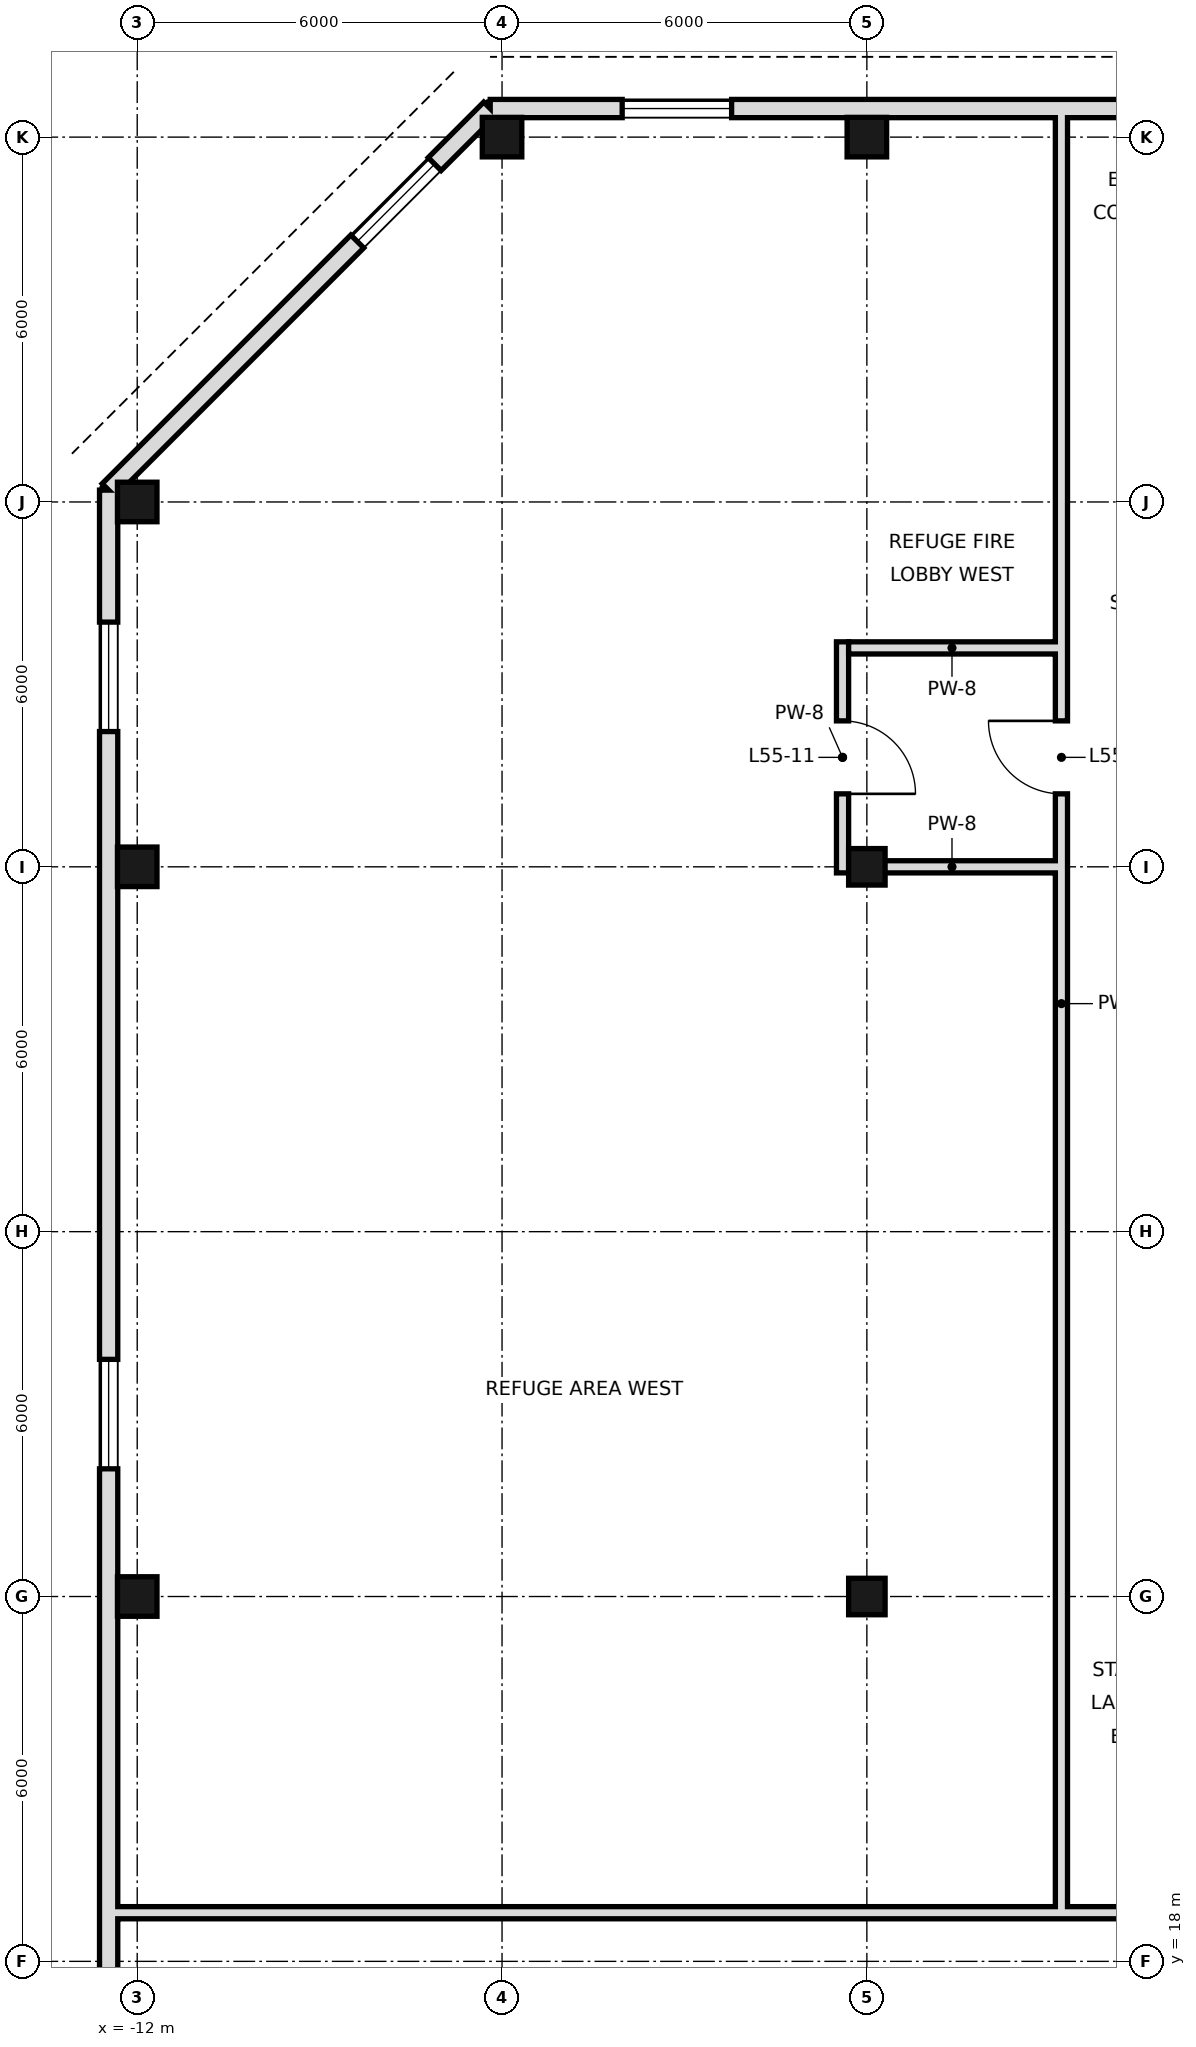
"""IFC4 building model, lengths in metres.
Left out: names, types, materials, properties, quantities, classifications, styles, units other than length and angle.
Written with IfcOpenShell. Run it as: python <this file> out.ifc"""

import sys

from ifc_helpers import new_model, si_unit, direction, frame, frame_2d, origin, origin_2d, place, context, subcontext, project, spatial, rectangle, hollow_rectangle, extrude, element, fill, save


model = new_model("IFC4")
c1 = context("Model", 3, precision=1e-05, world=origin(), true_north=direction((0.0, 1.0)))
c2 = subcontext(c1, "Body", "Model", "MODEL_VIEW")
j1 = project(units=[si_unit("LENGTHUNIT", "METRE"), si_unit("PLANEANGLEUNIT", "RADIAN")], contexts=[c1])
p1 = place(None, origin())
s1 = spatial("IfcSite", under=j1, at=p1, CompositionType="ELEMENT")
p2 = place(p1, origin())
s2 = spatial("IfcBuilding", under=s1, at=p2, CompositionType="ELEMENT")
p3 = place(p2, frame((0.0, 0.0, 234.2)))
s3 = spatial("IfcBuildingStorey", under=s2, at=p3, CompositionType="ELEMENT", Elevation=234.2)
for number, where, z_axis, x_axis in (
    (1, (-12.0, 24.0, 0.0), (0.0, 0.0, 1.0), (1.0, 0.0, 0.0)),
    (2, (-12.0, 36.0, 0.0), (0.0, 0.0, 1.0), (1.0, 0.0, 0.0)),
    (3, (-12.0, 42.0, 0.0), (0.0, 0.0, 1.0), (1.0, 0.0, 0.0)),
    (4, (-6.0, 48.0, 0.0), (0.0, 0.0, 1.0), (1.0, 0.0, 0.0)),
):
    element("IfcColumn", number, at=place(p3, frame(where, z_axis=z_axis, x_axis=x_axis)), inside=s3, PredefinedType="COLUMN", context=c2, shape_type="SweptSolid", body=[
        extrude(hollow_rectangle(XDim=0.65, YDim=0.65, WallThickness=0.032, at=origin_2d()), origin(), (0.0, 0.0, 1.0), 5.4),
    ])
for number, where, z_axis, x_axis in (
    (5, (0.0, 24.0, 0.0), (0.0, 0.0, 1.0), (1.0, 0.0, 0.0)),
    (6, (0.0, 36.0, 0.0), (0.0, 0.0, 1.0), (1.0, 0.0, 0.0)),
):
    element("IfcColumn", number, at=place(p3, frame(where, z_axis=z_axis, x_axis=x_axis)), inside=s3, PredefinedType="COLUMN", context=c2, shape_type="SweptSolid", body=[
        extrude(hollow_rectangle(XDim=0.6, YDim=0.6, WallThickness=0.028, at=origin_2d()), origin(), (0.0, 0.0, 1.0), 5.4),
    ])
p4 = place(p3, frame((0.0, 48.0, 0.0), z_axis=(0.0, 0.0, 1.0), x_axis=(1.0, 0.0, 0.0)))
e7 = element("IfcColumn", 7, at=p4, inside=s3, PredefinedType="COLUMN", context=c2, shape_type="SweptSolid", body=[
    extrude(hollow_rectangle(XDim=0.65, YDim=0.65, WallThickness=0.032, at=origin_2d()), origin(), (0.0, 0.0, 1.0), 5.4),
])
p5 = place(p3, frame((48.195, 48.47, 0.0), z_axis=(0.0, 0.0, 1.0), x_axis=(-1.0, 0.0, 0.0)))
e8 = element("IfcWall", 8, at=p5, inside=s3, PredefinedType="SOLIDWALL", context=c2, shape_type="SweptSolid", body=[
    extrude(rectangle(XDim=54.389, YDim=0.3, at=frame_2d((27.195, 0.0))), origin(), (0.0, 0.0, 1.0), 5.22),
])
p6 = place(p5, frame((1.271, 0.0, 0.9)))
e9 = element("IfcOpeningElement", 9, at=p6, cuts=e8, PredefinedType="OPENING", context=c2, shape_type="SweptSolid", body=[
    extrude(rectangle(XDim=1.8, YDim=1.5, at=frame_2d((0.9, 0.75))), frame((0.0, 0.16, 0.0), z_axis=(0.0, -1.0, 0.0), x_axis=(1.0, 0.0, 0.0)), (0.0, 0.0, 1.0), 0.32),
])
p7 = place(p5, frame((14.295, 0.0, 0.9)))
e10 = element("IfcOpeningElement", 10, at=p7, cuts=e8, PredefinedType="OPENING", context=c2, shape_type="SweptSolid", body=[
    extrude(rectangle(XDim=1.8, YDim=1.5, at=frame_2d((0.9, 0.75))), frame((0.0, 0.16, 0.0), z_axis=(0.0, -1.0, 0.0), x_axis=(1.0, 0.0, 0.0)), (0.0, 0.0, 1.0), 0.32),
])
p8 = place(p5, frame((26.295, 0.0, 0.9)))
e11 = element("IfcOpeningElement", 11, at=p8, cuts=e8, PredefinedType="OPENING", context=c2, shape_type="SweptSolid", body=[
    extrude(rectangle(XDim=1.8, YDim=1.5, at=frame_2d((0.9, 0.75))), frame((0.0, 0.16, 0.0), z_axis=(0.0, -1.0, 0.0), x_axis=(1.0, 0.0, 0.0)), (0.0, 0.0, 1.0), 0.32),
])
p9 = place(p5, frame((38.295, 0.0, 0.9)))
e12 = element("IfcOpeningElement", 12, at=p9, cuts=e8, PredefinedType="OPENING", context=c2, shape_type="SweptSolid", body=[
    extrude(rectangle(XDim=1.8, YDim=1.5, at=frame_2d((0.9, 0.75))), frame((0.0, 0.16, 0.0), z_axis=(0.0, -1.0, 0.0), x_axis=(1.0, 0.0, 0.0)), (0.0, 0.0, 1.0), 0.32),
])
p10 = place(p5, frame((50.419, 0.0, 0.9)))
e13 = element("IfcOpeningElement", 13, at=p10, cuts=e8, PredefinedType="OPENING", context=c2, shape_type="SweptSolid", body=[
    extrude(rectangle(XDim=1.8, YDim=1.5, at=frame_2d((0.9, 0.75))), frame((0.0, 0.16, 0.0), z_axis=(0.0, -1.0, 0.0), x_axis=(1.0, 0.0, 0.0)), (0.0, 0.0, 1.0), 0.32),
])
p11 = place(p3, frame((-6.195, 48.47, 0.0), z_axis=(0.0, 0.0, 1.0), x_axis=(-0.707106781187, -0.707106781187, 0.0)))
e14 = element("IfcWall", 14, at=p11, inside=s3, PredefinedType="SOLIDWALL", context=c2, shape_type="SweptSolid", body=[
    extrude(rectangle(XDim=8.875, YDim=0.3, at=frame_2d((4.438, 0.0))), origin(), (0.0, 0.0, 1.0), 5.22),
])
p12 = place(p11, frame((1.292, 0.0, 0.9)))
e15 = element("IfcOpeningElement", 15, at=p12, cuts=e14, PredefinedType="OPENING", context=c2, shape_type="SweptSolid", body=[
    extrude(rectangle(XDim=1.8, YDim=1.5, at=frame_2d((0.9, 0.75))), frame((0.0, 0.16, 0.0), z_axis=(0.0, -1.0, 0.0), x_axis=(1.0, 0.0, 0.0)), (0.0, 0.0, 1.0), 0.32),
])
p13 = place(p3, frame((-12.47, 42.195, 0.0), z_axis=(0.0, 0.0, 1.0), x_axis=(0.0, -1.0, 0.0)))
e16 = element("IfcWall", 16, at=p13, inside=s3, PredefinedType="SOLIDWALL", context=c2, shape_type="SweptSolid", body=[
    extrude(rectangle(XDim=36.389, YDim=0.3, at=frame_2d((18.195, 0.0))), origin(), (0.0, 0.0, 1.0), 5.22),
])
p14 = place(p13, frame((2.17, 0.0, 0.9)))
e17 = element("IfcOpeningElement", 17, at=p14, cuts=e16, PredefinedType="OPENING", context=c2, shape_type="SweptSolid", body=[
    extrude(rectangle(XDim=1.8, YDim=1.5, at=frame_2d((0.9, 0.75))), frame((0.0, 0.16, 0.0), z_axis=(0.0, -1.0, 0.0), x_axis=(1.0, 0.0, 0.0)), (0.0, 0.0, 1.0), 0.32),
])
p15 = place(p13, frame((14.295, 0.0, 0.9)))
e18 = element("IfcOpeningElement", 18, at=p15, cuts=e16, PredefinedType="OPENING", context=c2, shape_type="SweptSolid", body=[
    extrude(rectangle(XDim=1.8, YDim=1.5, at=frame_2d((0.9, 0.75))), frame((0.0, 0.16, 0.0), z_axis=(0.0, -1.0, 0.0), x_axis=(1.0, 0.0, 0.0)), (0.0, 0.0, 1.0), 0.32),
])
p16 = place(p13, frame((26.295, 0.0, 0.9)))
e19 = element("IfcOpeningElement", 19, at=p16, cuts=e16, PredefinedType="OPENING", context=c2, shape_type="SweptSolid", body=[
    extrude(rectangle(XDim=1.8, YDim=1.5, at=frame_2d((0.9, 0.75))), frame((0.0, 0.16, 0.0), z_axis=(0.0, -1.0, 0.0), x_axis=(1.0, 0.0, 0.0)), (0.0, 0.0, 1.0), 0.32),
])
p17 = place(p3, frame((-0.4, 35.9, 0.0), z_axis=(0.0, 0.0, 1.0), x_axis=(0.0, 1.0, 0.0)))
e20 = element("IfcWall", 20, at=p17, inside=s3, PredefinedType="SOLIDWALL", context=c2, shape_type="SweptSolid", body=[
    extrude(rectangle(XDim=3.8, YDim=0.2, at=frame_2d((1.9, 0.0))), origin(), (0.0, 0.0, 1.0), 5.22),
])
p18 = place(p17, frame((1.3, 0.0, 0.0)))
e21 = element("IfcOpeningElement", 21, at=p18, cuts=e20, PredefinedType="OPENING", context=c2, shape_type="SweptSolid", body=[
    extrude(rectangle(XDim=1.2, YDim=2.4, at=frame_2d((0.6, 1.2))), frame((0.0, 0.11, 0.0), z_axis=(0.0, -1.0, 0.0), x_axis=(1.0, 0.0, 0.0)), (0.0, 0.0, 1.0), 0.22),
])
p19 = place(p3, frame((3.2, 18.9, 0.0), z_axis=(0.0, 0.0, 1.0), x_axis=(0.0, 1.0, 0.0)))
e22 = element("IfcWall", 22, at=p19, inside=s3, PredefinedType="SOLIDWALL", context=c2, shape_type="SweptSolid", body=[
    extrude(rectangle(XDim=29.7, YDim=0.2, at=frame_2d((14.85, 0.0))), origin(), (0.0, 0.0, 1.0), 4.52),
])
p20 = place(p19, frame((18.3, 0.0, 0.0)))
e23 = element("IfcOpeningElement", 23, at=p20, cuts=e22, PredefinedType="OPENING", context=c2, shape_type="SweptSolid", body=[
    extrude(rectangle(XDim=1.2, YDim=2.4, at=frame_2d((0.6, 1.2))), frame((0.0, 0.11, 0.0), z_axis=(0.0, -1.0, 0.0), x_axis=(1.0, 0.0, 0.0)), (0.0, 0.0, 1.0), 0.22),
])
p21 = place(p3, frame((-12.6, 18.8, 0.0), z_axis=(0.0, 0.0, 1.0), x_axis=(1.0, 0.0, 0.0)))
e24 = element("IfcWall", 24, at=p21, inside=s3, PredefinedType="SOLIDWALL", context=c2, shape_type="SweptSolid", body=[
    extrude(rectangle(XDim=67.2, YDim=0.2, at=frame_2d((33.6, 0.0))), origin(), (0.0, 0.0, 1.0), 4.52),
])
p22 = place(p21, frame((23.2, 0.0, 0.0)))
e25 = element("IfcOpeningElement", 25, at=p22, cuts=e24, PredefinedType="OPENING", context=c2, shape_type="SweptSolid", body=[
    extrude(rectangle(XDim=1.2, YDim=2.4, at=frame_2d((0.6, 1.2))), frame((0.0, 0.11, 0.0), z_axis=(0.0, -1.0, 0.0), x_axis=(1.0, 0.0, 0.0)), (0.0, 0.0, 1.0), 0.22),
])
p23 = place(p3, frame((-0.3, 36.0, 0.0), z_axis=(0.0, 0.0, 1.0), x_axis=(1.0, 0.0, 0.0)))
e26 = element("IfcWall", 26, at=p23, inside=s3, PredefinedType="SOLIDWALL", context=c2, shape_type="SweptSolid", body=[
    extrude(rectangle(XDim=3.4, YDim=0.2, at=frame_2d((1.7, 0.0))), origin(), (0.0, 0.0, 1.0), 5.22),
])
p24 = place(p3, frame((-0.3, 39.6, 0.0), z_axis=(0.0, 0.0, 1.0), x_axis=(1.0, 0.0, 0.0)))
e27 = element("IfcWall", 27, at=p24, inside=s3, PredefinedType="SOLIDWALL", context=c2, shape_type="SweptSolid", body=[
    extrude(rectangle(XDim=3.4, YDim=0.2, at=frame_2d((1.7, 0.0))), origin(), (0.0, 0.0, 1.0), 4.52),
])
p25 = place(p10, origin())
e28 = element("IfcWindow", 28, at=p25, inside=s3, PartitioningType="SINGLE_PANEL", PredefinedType="WINDOW", context=c2, shape_type="SweptSolid", body=[
    extrude(rectangle(XDim=1.8, YDim=1.5, at=frame_2d((0.9, 0.75))), frame((0.0, 0.03, 0.0), z_axis=(0.0, -1.0, 0.0), x_axis=(1.0, 0.0, 0.0)), (0.0, 0.0, 1.0), 0.06),
])
fill(e13, e28)
p26 = place(p12, origin())
e29 = element("IfcWindow", 29, at=p26, inside=s3, PartitioningType="SINGLE_PANEL", PredefinedType="WINDOW", context=c2, shape_type="SweptSolid", body=[
    extrude(rectangle(XDim=1.8, YDim=1.5, at=frame_2d((0.9, 0.75))), frame((0.0, 0.03, 0.0), z_axis=(0.0, -1.0, 0.0), x_axis=(1.0, 0.0, 0.0)), (0.0, 0.0, 1.0), 0.06),
])
fill(e15, e29)
p27 = place(p14, origin())
e30 = element("IfcWindow", 30, at=p27, inside=s3, PartitioningType="SINGLE_PANEL", PredefinedType="WINDOW", context=c2, shape_type="SweptSolid", body=[
    extrude(rectangle(XDim=1.8, YDim=1.5, at=frame_2d((0.9, 0.75))), frame((0.0, 0.03, 0.0), z_axis=(0.0, -1.0, 0.0), x_axis=(1.0, 0.0, 0.0)), (0.0, 0.0, 1.0), 0.06),
])
fill(e17, e30)
p28 = place(p15, origin())
e31 = element("IfcWindow", 31, at=p28, inside=s3, PartitioningType="SINGLE_PANEL", PredefinedType="WINDOW", context=c2, shape_type="SweptSolid", body=[
    extrude(rectangle(XDim=1.8, YDim=1.5, at=frame_2d((0.9, 0.75))), frame((0.0, 0.03, 0.0), z_axis=(0.0, -1.0, 0.0), x_axis=(1.0, 0.0, 0.0)), (0.0, 0.0, 1.0), 0.06),
])
fill(e18, e31)
p29 = place(p18, frame((1.2, 0.0, 0.0), z_axis=(0.0, 0.0, 1.0), x_axis=(-1.0, 0.0, 0.0)))
e32 = element("IfcDoor", 32, at=p29, inside=s3, OperationType="SINGLE_SWING_RIGHT", PredefinedType="DOOR", context=c2, shape_type="SweptSolid", body=[
    extrude(rectangle(XDim=1.2, YDim=2.4, at=frame_2d((0.6, 1.2))), frame((0.0, 0.025, 0.0), z_axis=(0.0, -1.0, 0.0), x_axis=(1.0, 0.0, 0.0)), (0.0, 0.0, 1.0), 0.05),
])
fill(e21, e32)
p30 = place(p20, frame((1.2, 0.0, 0.0), z_axis=(0.0, 0.0, 1.0), x_axis=(-1.0, 0.0, 0.0)))
e33 = element("IfcDoor", 33, at=p30, inside=s3, OperationType="SINGLE_SWING_LEFT", PredefinedType="DOOR", context=c2, shape_type="SweptSolid", body=[
    extrude(rectangle(XDim=1.2, YDim=2.4, at=frame_2d((0.6, 1.2))), frame((0.0, 0.025, 0.0), z_axis=(0.0, -1.0, 0.0), x_axis=(1.0, 0.0, 0.0)), (0.0, 0.0, 1.0), 0.05),
])
fill(e23, e33)
save(model, sys.argv[1])
